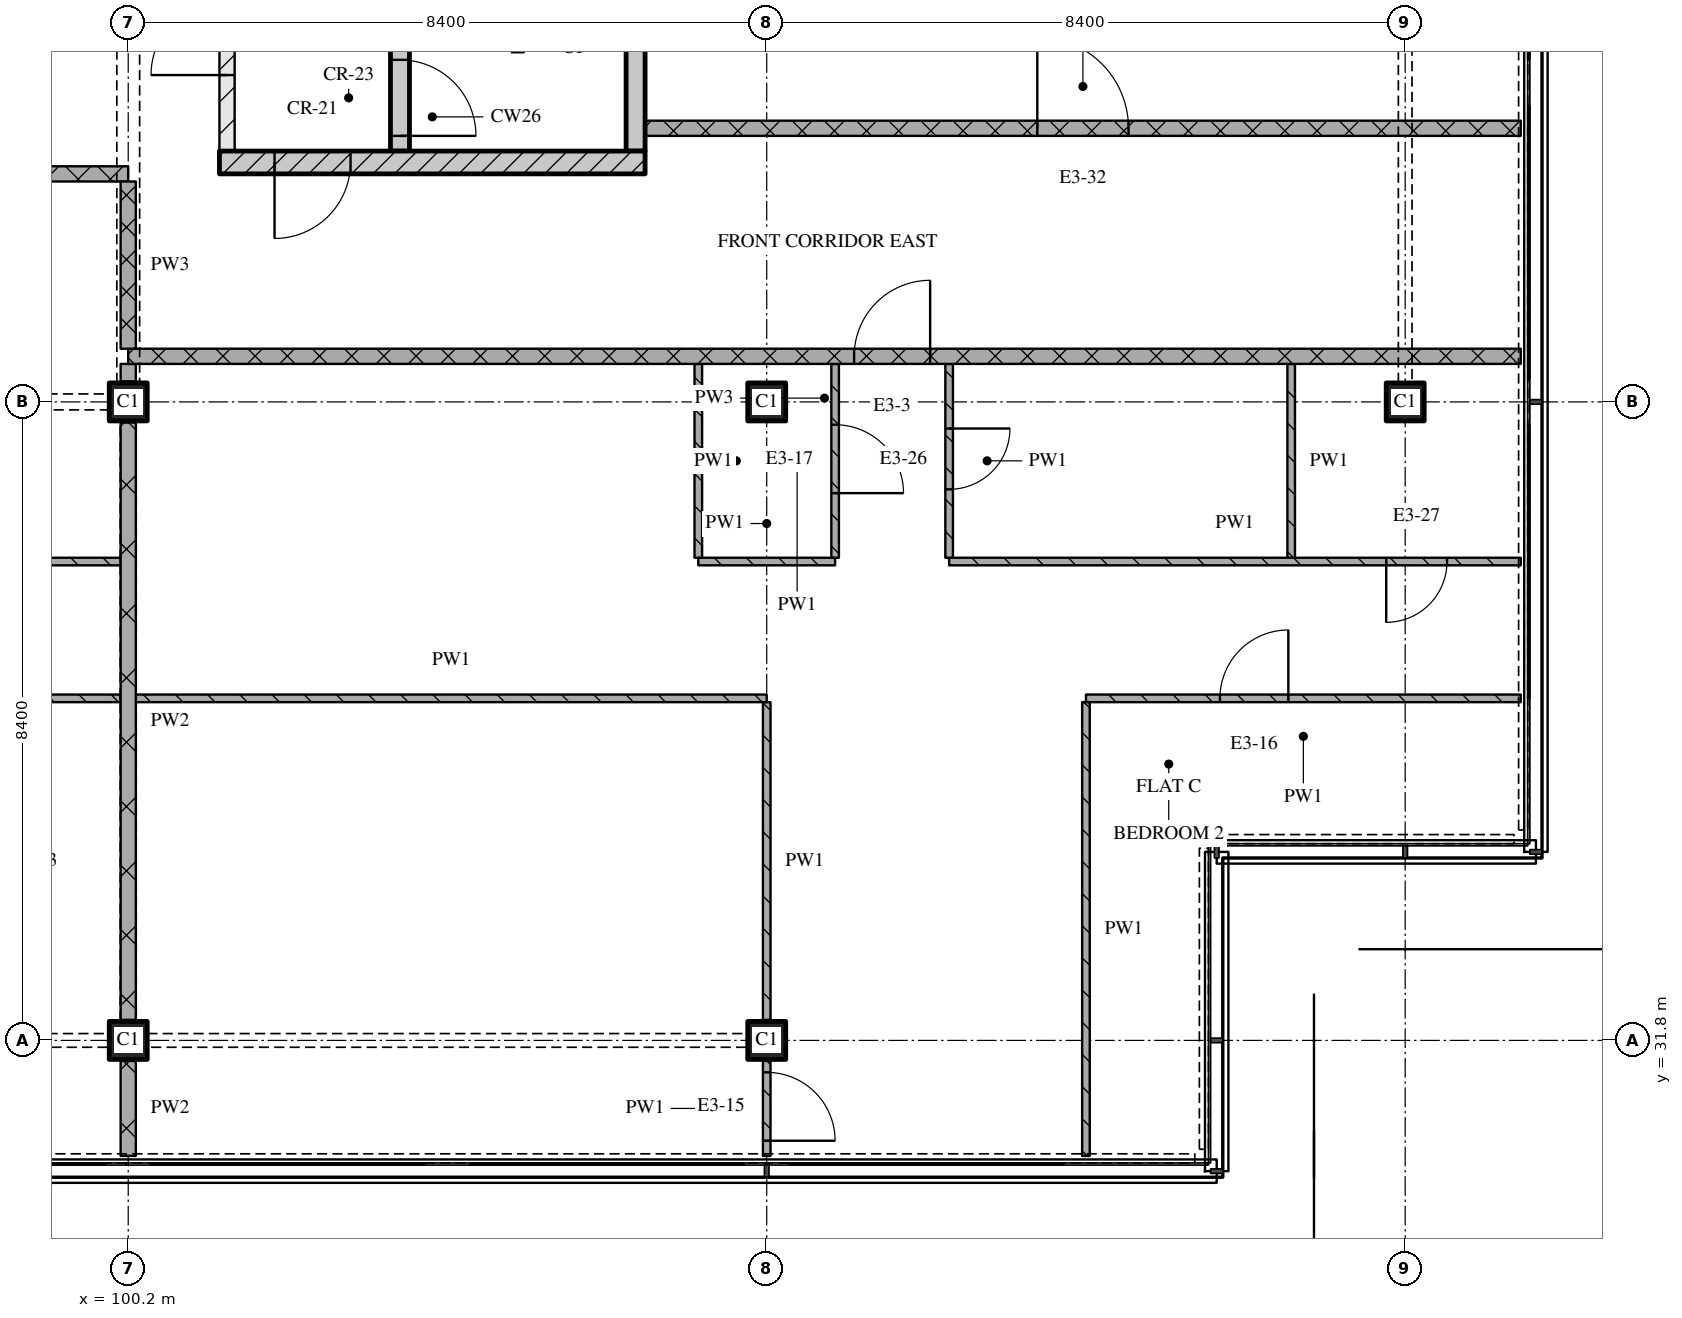
"""IFC4 building model, lengths in metres.
Left out: names, types, materials, properties, quantities, classifications, styles, units other than length and angle.
Written with IfcOpenShell. Run it as: python <this file> out.ifc"""

import sys

from ifc_helpers import new_model, si_unit, direction, frame, frame_2d, origin, origin_2d, place, context, subcontext, project, spatial, rectangle, extrude, element, fill, save


model = new_model("IFC4")
c1 = context("Model", 3, precision=1e-05, world=origin(), true_north=direction((0.0, 1.0)))
c2 = subcontext(c1, "Body", "Model", "MODEL_VIEW")
j1 = project(units=[si_unit("LENGTHUNIT", "METRE"), si_unit("PLANEANGLEUNIT", "RADIAN")], contexts=[c1])
p1 = place(None, origin())
s1 = spatial("IfcSite", under=j1, at=p1, CompositionType="ELEMENT")
p2 = place(p1, origin())
s2 = spatial("IfcBuilding", under=s1, at=p2, CompositionType="ELEMENT")
p3 = place(p2, frame((0.0, 0.0, 277.95)))
s3 = spatial("IfcBuildingStorey", under=s2, at=p3, CompositionType="ELEMENT", Elevation=277.95)
for number, where, z_axis, x_axis in (
    (1, (100.2, 31.8, 0.0), (0.0, 0.0, 1.0), (1.0, 0.0, 0.0)),
    (2, (100.2, 40.2, 0.0), (0.0, 0.0, 1.0), (1.0, 0.0, 0.0)),
    (3, (108.6, 31.8, 0.0), (0.0, 0.0, 1.0), (1.0, 0.0, 0.0)),
    (4, (108.6, 40.2, 0.0), (0.0, 0.0, 1.0), (1.0, 0.0, 0.0)),
    (5, (117.0, 40.2, 0.0), (0.0, 0.0, 1.0), (1.0, 0.0, 0.0)),
):
    element("IfcColumn", number, at=place(p3, frame(where, z_axis=z_axis, x_axis=x_axis)), inside=s3, PredefinedType="COLUMN", context=c2, shape_type="SweptSolid", body=[
        extrude(rectangle(XDim=0.5, YDim=0.5, at=origin_2d()), origin(), (0.0, 0.0, 1.0), 3.6),
    ])
p4 = place(p3, frame((101.4, 43.35, 0.0), z_axis=(0.0, 0.0, 1.0), x_axis=(1.0, 0.0, 0.0)))
e6 = element("IfcWall", 6, at=p4, inside=s3, PredefinedType="SOLIDWALL", context=c2, shape_type="SweptSolid", body=[
    extrude(rectangle(XDim=5.6, YDim=0.3, at=frame_2d((2.8, 0.0))), origin(), (0.0, 0.0, 1.0), 3.32),
])
p5 = place(p4, frame((0.725, 0.0, 0.0)))
e7 = element("IfcOpeningElement", 7, at=p5, cuts=e6, PredefinedType="OPENING", context=c2, shape_type="SweptSolid", body=[
    extrude(rectangle(XDim=1.0, YDim=2.1, at=frame_2d((0.5, 1.05))), frame((0.0, 0.16, 0.0), z_axis=(0.0, -1.0, 0.0), x_axis=(1.0, 0.0, 0.0)), (0.0, 0.0, 1.0), 0.32),
])
p6 = place(p3, frame((101.5, 43.5, 0.0), z_axis=(0.0, 0.0, 1.0), x_axis=(0.0, 1.0, 0.0)))
e8 = element("IfcWall", 8, at=p6, inside=s3, PredefinedType="PARTITIONING", context=c2, shape_type="SweptSolid", body=[
    extrude(rectangle(XDim=6.9, YDim=0.2, at=frame_2d((3.45, 0.0))), origin(), (0.0, 0.0, 1.0), 3.32),
])
p7 = place(p6, frame((1.0, 0.0, 0.0)))
e9 = element("IfcOpeningElement", 9, at=p7, cuts=e8, PredefinedType="OPENING", context=c2, shape_type="SweptSolid", body=[
    extrude(rectangle(XDim=1.0, YDim=2.1, at=frame_2d((0.5, 1.05))), frame((0.0, 0.11, 0.0), z_axis=(0.0, -1.0, 0.0), x_axis=(1.0, 0.0, 0.0)), (0.0, 0.0, 1.0), 0.22),
])
p8 = place(p3, frame((103.775, 43.5, 0.0), z_axis=(0.0, 0.0, 1.0), x_axis=(0.0, 1.0, 0.0)))
e10 = element("IfcWall", 10, at=p8, inside=s3, PredefinedType="SOLIDWALL", context=c2, shape_type="SweptSolid", body=[
    extrude(rectangle(XDim=6.9, YDim=0.25, at=frame_2d((3.45, 0.0))), origin(), (0.0, 0.0, 1.0), 3.32),
])
p9 = place(p8, frame((0.2, 0.0, 0.0)))
e11 = element("IfcOpeningElement", 11, at=p9, cuts=e10, PredefinedType="OPENING", context=c2, shape_type="SweptSolid", body=[
    extrude(rectangle(XDim=1.0, YDim=2.1, at=frame_2d((0.5, 1.05))), frame((0.0, 0.135, 0.0), z_axis=(0.0, -1.0, 0.0), x_axis=(1.0, 0.0, 0.0)), (0.0, 0.0, 1.0), 0.27),
])
p10 = place(p3, frame((106.875, 43.5, 0.0), z_axis=(0.0, 0.0, 1.0), x_axis=(0.0, 1.0, 0.0)))
e12 = element("IfcWall", 12, at=p10, inside=s3, PredefinedType="SOLIDWALL", context=c2, shape_type="SweptSolid", body=[
    extrude(rectangle(XDim=6.9, YDim=0.25, at=frame_2d((3.45, 0.0))), origin(), (0.0, 0.0, 1.0), 3.32),
])
p11 = place(p3, frame((118.52, 36.3, 0.0), z_axis=(0.0, 0.0, 1.0), x_axis=(-1.0, 0.0, 0.0)))
e13 = element("IfcWall", 13, at=p11, inside=s3, PredefinedType="PARTITIONING", context=c2, shape_type="SweptSolid", body=[
    extrude(rectangle(XDim=5.72, YDim=0.1, at=frame_2d((2.86, 0.0))), origin(), (0.0, 0.0, 1.0), 3.32),
])
p12 = place(p11, frame((3.058, 0.0, 0.0)))
e14 = element("IfcOpeningElement", 14, at=p12, cuts=e13, PredefinedType="OPENING", context=c2, shape_type="SweptSolid", body=[
    extrude(rectangle(XDim=0.9, YDim=2.1, at=frame_2d((0.45, 1.05))), frame((0.0, 0.06, 0.0), z_axis=(0.0, -1.0, 0.0), x_axis=(1.0, 0.0, 0.0)), (0.0, 0.0, 1.0), 0.12),
])
p13 = place(p3, frame((90.6, 38.1, 0.0), z_axis=(0.0, 0.0, 1.0), x_axis=(1.0, 0.0, 0.0)))
e15 = element("IfcWall", 15, at=p13, inside=s3, PredefinedType="PARTITIONING", context=c2, shape_type="SweptSolid", body=[
    extrude(rectangle(XDim=9.5, YDim=0.1, at=frame_2d((4.75, 0.0))), origin(), (0.0, 0.0, 1.0), 3.32),
])
p14 = place(p13, frame((4.35, 0.0, 0.0)))
e16 = element("IfcOpeningElement", 16, at=p14, cuts=e15, PredefinedType="OPENING", context=c2, shape_type="SweptSolid", body=[
    extrude(rectangle(XDim=0.9, YDim=2.1, at=frame_2d((0.45, 1.05))), frame((0.0, 0.06, 0.0), z_axis=(0.0, -1.0, 0.0), x_axis=(1.0, 0.0, 0.0)), (0.0, 0.0, 1.0), 0.12),
])
p15 = place(p3, frame((107.7, 38.1, 0.0), z_axis=(0.0, 0.0, 1.0), x_axis=(1.0, 0.0, 0.0)))
e17 = element("IfcWall", 17, at=p15, inside=s3, PredefinedType="PARTITIONING", context=c2, shape_type="SweptSolid", body=[
    extrude(rectangle(XDim=1.8, YDim=0.1, at=frame_2d((0.9, 0.0))), origin(), (0.0, 0.0, 1.0), 3.32),
])
p16 = place(p3, frame((111.0, 38.1, 0.0), z_axis=(0.0, 0.0, 1.0), x_axis=(1.0, 0.0, 0.0)))
e18 = element("IfcWall", 18, at=p16, inside=s3, PredefinedType="PARTITIONING", context=c2, shape_type="SweptSolid", body=[
    extrude(rectangle(XDim=7.52, YDim=0.1, at=frame_2d((3.76, 0.0))), origin(), (0.0, 0.0, 1.0), 3.32),
])
p17 = place(p16, frame((5.75, 0.0, 0.0)))
e19 = element("IfcOpeningElement", 19, at=p17, cuts=e18, PredefinedType="OPENING", context=c2, shape_type="SweptSolid", body=[
    extrude(rectangle(XDim=0.8, YDim=2.1, at=frame_2d((0.4, 1.05))), frame((0.0, 0.06, 0.0), z_axis=(0.0, -1.0, 0.0), x_axis=(1.0, 0.0, 0.0)), (0.0, 0.0, 1.0), 0.12),
])
p18 = place(p3, frame((118.52, 40.8, 0.0), z_axis=(0.0, 0.0, 1.0), x_axis=(-1.0, 0.0, 0.0)))
e20 = element("IfcWall", 20, at=p18, inside=s3, PredefinedType="PARTITIONING", context=c2, shape_type="SweptSolid", body=[
    extrude(rectangle(XDim=18.32, YDim=0.2, at=frame_2d((9.16, 0.0))), origin(), (0.0, 0.0, 1.0), 3.32),
])
p19 = place(p18, frame((7.77, 0.0, 0.0)))
e21 = element("IfcOpeningElement", 21, at=p19, cuts=e20, PredefinedType="OPENING", context=c2, shape_type="SweptSolid", body=[
    extrude(rectangle(XDim=1.0, YDim=2.1, at=frame_2d((0.5, 1.05))), frame((0.0, 0.11, 0.0), z_axis=(0.0, -1.0, 0.0), x_axis=(1.0, 0.0, 0.0)), (0.0, 0.0, 1.0), 0.22),
])
p20 = place(p3, frame((100.2, 43.2, 0.0), z_axis=(0.0, 0.0, 1.0), x_axis=(-1.0, 0.0, 0.0)))
e22 = element("IfcWall", 22, at=p20, inside=s3, PredefinedType="PARTITIONING", context=c2, shape_type="SweptSolid", body=[
    extrude(rectangle(XDim=25.2, YDim=0.2, at=frame_2d((12.6, 0.0))), origin(), (0.0, 0.0, 1.0), 3.32),
])
p21 = place(p20, frame((17.35, 0.0, 0.0)))
e23 = element("IfcOpeningElement", 23, at=p21, cuts=e22, PredefinedType="OPENING", context=c2, shape_type="SweptSolid", body=[
    extrude(rectangle(XDim=1.0, YDim=2.1, at=frame_2d((0.5, 1.05))), frame((0.0, 0.11, 0.0), z_axis=(0.0, -1.0, 0.0), x_axis=(1.0, 0.0, 0.0)), (0.0, 0.0, 1.0), 0.22),
])
p22 = place(p3, frame((107.0, 43.8, 0.0), z_axis=(0.0, 0.0, 1.0), x_axis=(1.0, 0.0, 0.0)))
e24 = element("IfcWall", 24, at=p22, inside=s3, PredefinedType="PARTITIONING", context=c2, shape_type="SweptSolid", body=[
    extrude(rectangle(XDim=11.52, YDim=0.2, at=frame_2d((5.76, 0.0))), origin(), (0.0, 0.0, 1.0), 3.32),
])
p23 = place(p22, frame((5.16, 0.0, 0.0)))
e25 = element("IfcOpeningElement", 25, at=p23, cuts=e24, PredefinedType="OPENING", context=c2, shape_type="SweptSolid", body=[
    extrude(rectangle(XDim=1.2, YDim=2.1, at=frame_2d((0.6, 1.05))), frame((0.0, 0.11, 0.0), z_axis=(0.0, -1.0, 0.0), x_axis=(1.0, 0.0, 0.0)), (0.0, 0.0, 1.0), 0.22),
])
p24 = place(p3, frame((100.2, 43.1, 0.0), z_axis=(0.0, 0.0, 1.0), x_axis=(0.0, -1.0, 0.0)))
e26 = element("IfcWall", 26, at=p24, inside=s3, PredefinedType="PARTITIONING", context=c2, shape_type="SweptSolid", body=[
    extrude(rectangle(XDim=2.2, YDim=0.2, at=frame_2d((1.1, 0.0))), origin(), (0.0, 0.0, 1.0), 2.53),
])
p25 = place(p3, frame((100.2, 31.53, 0.0), z_axis=(0.0, 0.0, 1.0), x_axis=(0.0, -1.0, 0.0)))
e27 = element("IfcWall", 27, at=p25, inside=s3, PredefinedType="PARTITIONING", context=c2, shape_type="SweptSolid", body=[
    extrude(rectangle(XDim=1.25, YDim=0.2, at=frame_2d((0.625, 0.0))), origin(), (0.0, 0.0, 1.0), 3.32),
])
p26 = place(p3, frame((100.2, 39.93, 0.0), z_axis=(0.0, 0.0, 1.0), x_axis=(0.0, -1.0, 0.0)))
e28 = element("IfcWall", 28, at=p26, inside=s3, PredefinedType="PARTITIONING", context=c2, shape_type="SweptSolid", body=[
    extrude(rectangle(XDim=7.86, YDim=0.2, at=frame_2d((3.93, 0.0))), origin(), (0.0, 0.0, 1.0), 2.77),
])
p27 = place(p3, frame((100.2, 40.7, 0.0), z_axis=(0.0, 0.0, 1.0), x_axis=(0.0, -1.0, 0.0)))
e29 = element("IfcWall", 29, at=p27, inside=s3, PredefinedType="PARTITIONING", context=c2, shape_type="SweptSolid", body=[
    extrude(rectangle(XDim=0.23, YDim=0.2, at=frame_2d((0.115, 0.0))), origin(), (0.0, 0.0, 1.0), 3.32),
])
p28 = place(p3, frame((107.7, 40.7, 0.0), z_axis=(0.0, 0.0, 1.0), x_axis=(0.0, -1.0, 0.0)))
e30 = element("IfcWall", 30, at=p28, inside=s3, PredefinedType="PARTITIONING", context=c2, shape_type="SweptSolid", body=[
    extrude(rectangle(XDim=2.55, YDim=0.1, at=frame_2d((1.275, 0.0))), origin(), (0.0, 0.0, 1.0), 3.32),
])
p29 = place(p3, frame((108.6, 30.28, 0.0), z_axis=(0.0, 0.0, 1.0), x_axis=(0.0, 1.0, 0.0)))
e31 = element("IfcWall", 31, at=p29, inside=s3, PredefinedType="PARTITIONING", context=c2, shape_type="SweptSolid", body=[
    extrude(rectangle(XDim=1.25, YDim=0.1, at=frame_2d((0.625, 0.0))), origin(), (0.0, 0.0, 1.0), 3.32),
])
p30 = place(p29, frame((0.2, 0.0, 0.0)))
e32 = element("IfcOpeningElement", 32, at=p30, cuts=e31, PredefinedType="OPENING", context=c2, shape_type="SweptSolid", body=[
    extrude(rectangle(XDim=0.9, YDim=2.1, at=frame_2d((0.45, 1.05))), frame((0.0, 0.06, 0.0), z_axis=(0.0, -1.0, 0.0), x_axis=(1.0, 0.0, 0.0)), (0.0, 0.0, 1.0), 0.12),
])
p31 = place(p3, frame((108.6, 36.25, 0.0), z_axis=(0.0, 0.0, 1.0), x_axis=(0.0, -1.0, 0.0)))
e33 = element("IfcWall", 33, at=p31, inside=s3, PredefinedType="PARTITIONING", context=c2, shape_type="SweptSolid", body=[
    extrude(rectangle(XDim=4.18, YDim=0.1, at=frame_2d((2.09, 0.0))), origin(), (0.0, 0.0, 1.0), 3.32),
])
p32 = place(p3, frame((109.5, 38.15, 0.0), z_axis=(0.0, 0.0, 1.0), x_axis=(0.0, 1.0, 0.0)))
e34 = element("IfcWall", 34, at=p32, inside=s3, PredefinedType="PARTITIONING", context=c2, shape_type="SweptSolid", body=[
    extrude(rectangle(XDim=2.55, YDim=0.1, at=frame_2d((1.275, 0.0))), origin(), (0.0, 0.0, 1.0), 3.32),
])
p33 = place(p32, frame((0.85, 0.0, 0.0)))
e35 = element("IfcOpeningElement", 35, at=p33, cuts=e34, PredefinedType="OPENING", context=c2, shape_type="SweptSolid", body=[
    extrude(rectangle(XDim=0.9, YDim=2.1, at=frame_2d((0.45, 1.05))), frame((0.0, 0.06, 0.0), z_axis=(0.0, -1.0, 0.0), x_axis=(1.0, 0.0, 0.0)), (0.0, 0.0, 1.0), 0.12),
])
p34 = place(p3, frame((111.0, 40.7, 0.0), z_axis=(0.0, 0.0, 1.0), x_axis=(0.0, -1.0, 0.0)))
e36 = element("IfcWall", 36, at=p34, inside=s3, PredefinedType="PARTITIONING", context=c2, shape_type="SweptSolid", body=[
    extrude(rectangle(XDim=2.55, YDim=0.1, at=frame_2d((1.275, 0.0))), origin(), (0.0, 0.0, 1.0), 3.32),
])
p35 = place(p34, frame((0.85, 0.0, 0.0)))
e37 = element("IfcOpeningElement", 37, at=p35, cuts=e36, PredefinedType="OPENING", context=c2, shape_type="SweptSolid", body=[
    extrude(rectangle(XDim=0.8, YDim=2.1, at=frame_2d((0.4, 1.05))), frame((0.0, 0.06, 0.0), z_axis=(0.0, -1.0, 0.0), x_axis=(1.0, 0.0, 0.0)), (0.0, 0.0, 1.0), 0.12),
])
p36 = place(p3, frame((112.8, 36.25, 0.0), z_axis=(0.0, 0.0, 1.0), x_axis=(0.0, -1.0, 0.0)))
e38 = element("IfcWall", 38, at=p36, inside=s3, PredefinedType="PARTITIONING", context=c2, shape_type="SweptSolid", body=[
    extrude(rectangle(XDim=5.97, YDim=0.1, at=frame_2d((2.985, 0.0))), origin(), (0.0, 0.0, 1.0), 3.32),
])
p37 = place(p3, frame((115.5, 40.7, 0.0), z_axis=(0.0, 0.0, 1.0), x_axis=(0.0, -1.0, 0.0)))
e39 = element("IfcWall", 39, at=p37, inside=s3, PredefinedType="PARTITIONING", context=c2, shape_type="SweptSolid", body=[
    extrude(rectangle(XDim=2.55, YDim=0.1, at=frame_2d((1.275, 0.0))), origin(), (0.0, 0.0, 1.0), 3.32),
])
p38 = place(p3, frame((100.1, 36.3, 0.0), z_axis=(0.0, 0.0, 1.0), x_axis=(-1.0, 0.0, 0.0)))
e40 = element("IfcWall", 40, at=p38, inside=s3, PredefinedType="PARTITIONING", context=c2, shape_type="SweptSolid", body=[
    extrude(rectangle(XDim=12.5, YDim=0.1, at=frame_2d((6.25, 0.0))), origin(), (0.0, 0.0, 1.0), 3.32),
])
p39 = place(p38, frame((1.55, 0.0, 0.0)))
e41 = element("IfcOpeningElement", 41, at=p39, cuts=e40, PredefinedType="OPENING", context=c2, shape_type="SweptSolid", body=[
    extrude(rectangle(XDim=0.9, YDim=2.1, at=frame_2d((0.45, 1.05))), frame((0.0, 0.06, 0.0), z_axis=(0.0, -1.0, 0.0), x_axis=(1.0, 0.0, 0.0)), (0.0, 0.0, 1.0), 0.12),
])
p40 = place(p38, frame((7.85, 0.0, 0.0)))
e42 = element("IfcOpeningElement", 42, at=p40, cuts=e40, PredefinedType="OPENING", context=c2, shape_type="SweptSolid", body=[
    extrude(rectangle(XDim=0.9, YDim=2.1, at=frame_2d((0.45, 1.05))), frame((0.0, 0.06, 0.0), z_axis=(0.0, -1.0, 0.0), x_axis=(1.0, 0.0, 0.0)), (0.0, 0.0, 1.0), 0.12),
])
p41 = place(p3, frame((100.3, 36.3, 0.0), z_axis=(0.0, 0.0, 1.0), x_axis=(1.0, 0.0, 0.0)))
e43 = element("IfcWall", 43, at=p41, inside=s3, PredefinedType="PARTITIONING", context=c2, shape_type="SweptSolid", body=[
    extrude(rectangle(XDim=8.3, YDim=0.1, at=frame_2d((4.15, 0.0))), origin(), (0.0, 0.0, 1.0), 3.32),
])
p42 = place(p5, origin())
e44 = element("IfcDoor", 44, at=p42, inside=s3, OperationType="SINGLE_SWING_RIGHT", PredefinedType="DOOR", context=c2, shape_type="SweptSolid", body=[
    extrude(rectangle(XDim=1.0, YDim=2.1, at=frame_2d((0.5, 1.05))), frame((0.0, 0.025, 0.0), z_axis=(0.0, -1.0, 0.0), x_axis=(1.0, 0.0, 0.0)), (0.0, 0.0, 1.0), 0.05),
])
fill(e7, e44)
p43 = place(p9, origin())
e45 = element("IfcDoor", 45, at=p43, inside=s3, OperationType="SINGLE_SWING_RIGHT", PredefinedType="DOOR", context=c2, shape_type="SweptSolid", body=[
    extrude(rectangle(XDim=1.0, YDim=2.1, at=frame_2d((0.5, 1.05))), frame((0.0, 0.025, 0.0), z_axis=(0.0, -1.0, 0.0), x_axis=(1.0, 0.0, 0.0)), (0.0, 0.0, 1.0), 0.05),
])
fill(e11, e45)
p44 = place(p7, origin())
e46 = element("IfcDoor", 46, at=p44, inside=s3, OperationType="SINGLE_SWING_LEFT", PredefinedType="DOOR", context=c2, shape_type="SweptSolid", body=[
    extrude(rectangle(XDim=1.0, YDim=2.1, at=frame_2d((0.5, 1.05))), frame((0.0, 0.025, 0.0), z_axis=(0.0, -1.0, 0.0), x_axis=(1.0, 0.0, 0.0)), (0.0, 0.0, 1.0), 0.05),
])
fill(e9, e46)
p45 = place(p12, origin())
e47 = element("IfcDoor", 47, at=p45, inside=s3, OperationType="SINGLE_SWING_RIGHT", PredefinedType="DOOR", context=c2, shape_type="SweptSolid", body=[
    extrude(rectangle(XDim=0.9, YDim=2.1, at=frame_2d((0.45, 1.05))), frame((0.0, 0.025, 0.0), z_axis=(0.0, -1.0, 0.0), x_axis=(1.0, 0.0, 0.0)), (0.0, 0.0, 1.0), 0.05),
])
fill(e14, e47)
p46 = place(p17, origin())
e48 = element("IfcDoor", 48, at=p46, inside=s3, OperationType="SINGLE_SWING_RIGHT", PredefinedType="DOOR", context=c2, shape_type="SweptSolid", body=[
    extrude(rectangle(XDim=0.8, YDim=2.1, at=frame_2d((0.4, 1.05))), frame((0.0, 0.025, 0.0), z_axis=(0.0, -1.0, 0.0), x_axis=(1.0, 0.0, 0.0)), (0.0, 0.0, 1.0), 0.05),
])
fill(e19, e48)
p47 = place(p19, origin())
e49 = element("IfcDoor", 49, at=p47, inside=s3, OperationType="SINGLE_SWING_RIGHT", PredefinedType="DOOR", context=c2, shape_type="SweptSolid", body=[
    extrude(rectangle(XDim=1.0, YDim=2.1, at=frame_2d((0.5, 1.05))), frame((0.0, 0.025, 0.0), z_axis=(0.0, -1.0, 0.0), x_axis=(1.0, 0.0, 0.0)), (0.0, 0.0, 1.0), 0.05),
])
fill(e21, e49)
p48 = place(p23, origin())
e50 = element("IfcDoor", 50, at=p48, inside=s3, OperationType="SINGLE_SWING_LEFT", PredefinedType="DOOR", context=c2, shape_type="SweptSolid", body=[
    extrude(rectangle(XDim=1.2, YDim=2.1, at=frame_2d((0.6, 1.05))), frame((0.0, 0.025, 0.0), z_axis=(0.0, -1.0, 0.0), x_axis=(1.0, 0.0, 0.0)), (0.0, 0.0, 1.0), 0.05),
])
fill(e25, e50)
p49 = place(p30, origin())
e51 = element("IfcDoor", 51, at=p49, inside=s3, OperationType="SINGLE_SWING_RIGHT", PredefinedType="DOOR", context=c2, shape_type="SweptSolid", body=[
    extrude(rectangle(XDim=0.9, YDim=2.1, at=frame_2d((0.45, 1.05))), frame((0.0, 0.025, 0.0), z_axis=(0.0, -1.0, 0.0), x_axis=(1.0, 0.0, 0.0)), (0.0, 0.0, 1.0), 0.05),
])
fill(e32, e51)
p50 = place(p33, origin())
e52 = element("IfcDoor", 52, at=p50, inside=s3, OperationType="SINGLE_SWING_RIGHT", PredefinedType="DOOR", context=c2, shape_type="SweptSolid", body=[
    extrude(rectangle(XDim=0.9, YDim=2.1, at=frame_2d((0.45, 1.05))), frame((0.0, 0.025, 0.0), z_axis=(0.0, -1.0, 0.0), x_axis=(1.0, 0.0, 0.0)), (0.0, 0.0, 1.0), 0.05),
])
fill(e35, e52)
p51 = place(p35, origin())
e53 = element("IfcDoor", 53, at=p51, inside=s3, OperationType="SINGLE_SWING_LEFT", PredefinedType="DOOR", context=c2, shape_type="SweptSolid", body=[
    extrude(rectangle(XDim=0.8, YDim=2.1, at=frame_2d((0.4, 1.05))), frame((0.0, 0.025, 0.0), z_axis=(0.0, -1.0, 0.0), x_axis=(1.0, 0.0, 0.0)), (0.0, 0.0, 1.0), 0.05),
])
fill(e37, e53)
save(model, sys.argv[1])
